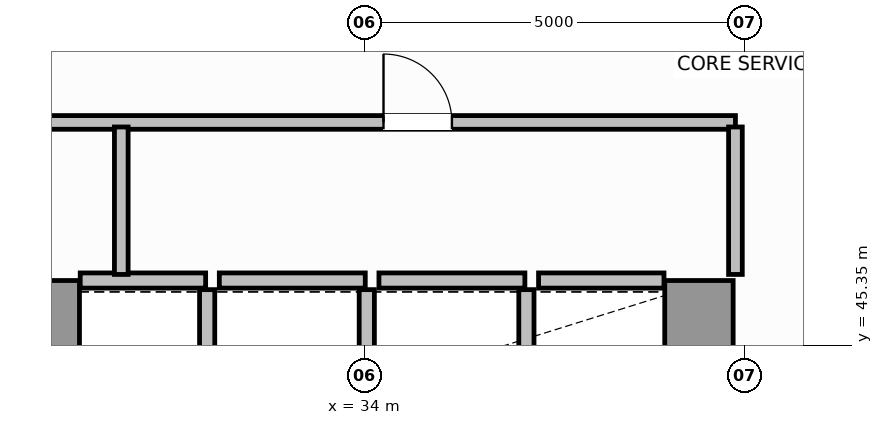
"""IFC4 building model, lengths in metres.
Left out: names, types, materials, properties, quantities, classifications, styles, units other than length and angle.
Written with IfcOpenShell. Run it as: python <this file> out.ifc"""

import sys

from ifc_helpers import new_model, si_unit, direction, frame, frame_2d, origin, place, context, subcontext, project, spatial, rectangle, extrude, source, transform, mapped, element, fill, save


model = new_model("IFC4")
c1 = context("Model", 3, precision=1e-05, world=origin(), true_north=direction((0.0, 1.0)))
c2 = subcontext(c1, "Body", "Model", "MODEL_VIEW")
j1 = project(units=[si_unit("LENGTHUNIT", "METRE"), si_unit("PLANEANGLEUNIT", "RADIAN")], contexts=[c1])
p1 = place(None, origin())
s1 = spatial("IfcSite", under=j1, at=p1, CompositionType="ELEMENT")
p2 = place(p1, origin())
s2 = spatial("IfcBuilding", under=s1, at=p2, CompositionType="ELEMENT")
p3 = place(p2, frame((0.0, 0.0, 45.4)))
s3 = spatial("IfcBuildingStorey", under=s2, at=p3, CompositionType="ELEMENT", Elevation=45.4)
for number, where, z_axis, x_axis in (
    (1, (29.8, 36.97, 0.0), (0.0, 0.0, 1.0), (0.0, 1.0, 0.0)),
    (2, (38.4, 36.97, 0.0), (0.0, 0.0, 1.0), (0.0, 1.0, 0.0)),
):
    element("IfcWall", number, at=place(p3, frame(where, z_axis=z_axis, x_axis=x_axis)), inside=s3, PredefinedType="SHEAR", context=c2, shape_type="SweptSolid", body=[
        extrude(rectangle(XDim=9.23, YDim=0.9, at=frame_2d((4.615, 0.0))), origin(), (0.0, 0.0, 1.0), 3.8),
    ])
p4 = place(p3, frame((30.26, 46.2, 0.0), z_axis=(0.0, 0.0, 1.0), x_axis=(1.0, 0.0, 0.0)))
e3 = element("IfcWall", 3, at=p4, inside=s3, PredefinedType="SOLIDWALL", context=c2, shape_type="SweptSolid", body=[
    extrude(rectangle(XDim=1.65, YDim=0.2, at=frame_2d((0.825, 0.0))), origin(), (0.0, 0.0, 1.0), 3.58),
])
p5 = place(p3, frame((31.93, 43.52, 0.0), z_axis=(0.0, 0.0, 1.0), x_axis=(0.0, 1.0, 0.0)))
e4 = element("IfcWall", 4, at=p5, inside=s3, PredefinedType="SOLIDWALL", context=c2, shape_type="SweptSolid", body=[
    extrude(rectangle(XDim=2.56, YDim=0.2, at=frame_2d((1.28, 0.0))), origin(), (0.0, 0.0, 1.0), 3.58),
])
p6 = place(p3, frame((32.09, 46.2, 0.0), z_axis=(0.0, 0.0, 1.0), x_axis=(1.0, 0.0, 0.0)))
e5 = element("IfcWall", 5, at=p6, inside=s3, PredefinedType="SOLIDWALL", context=c2, shape_type="SweptSolid", body=[
    extrude(rectangle(XDim=1.92, YDim=0.2, at=frame_2d((0.96, 0.0))), origin(), (0.0, 0.0, 1.0), 3.58),
])
p7 = place(p3, frame((34.03, 43.52, 0.0), z_axis=(0.0, 0.0, 1.0), x_axis=(0.0, 1.0, 0.0)))
e6 = element("IfcWall", 6, at=p7, inside=s3, PredefinedType="SOLIDWALL", context=c2, shape_type="SweptSolid", body=[
    extrude(rectangle(XDim=2.56, YDim=0.2, at=frame_2d((1.28, 0.0))), origin(), (0.0, 0.0, 1.0), 3.58),
])
p8 = place(p3, frame((34.19, 46.2, 0.0), z_axis=(0.0, 0.0, 1.0), x_axis=(1.0, 0.0, 0.0)))
e7 = element("IfcWall", 7, at=p8, inside=s3, PredefinedType="SOLIDWALL", context=c2, shape_type="SweptSolid", body=[
    extrude(rectangle(XDim=1.92, YDim=0.2, at=frame_2d((0.96, 0.0))), origin(), (0.0, 0.0, 1.0), 3.58),
])
p9 = place(p3, frame((36.13, 43.52, 0.0), z_axis=(0.0, 0.0, 1.0), x_axis=(0.0, 1.0, 0.0)))
e8 = element("IfcWall", 8, at=p9, inside=s3, PredefinedType="SOLIDWALL", context=c2, shape_type="SweptSolid", body=[
    extrude(rectangle(XDim=2.56, YDim=0.2, at=frame_2d((1.28, 0.0))), origin(), (0.0, 0.0, 1.0), 3.58),
])
p10 = place(p3, frame((36.29, 46.2, 0.0), z_axis=(0.0, 0.0, 1.0), x_axis=(1.0, 0.0, 0.0)))
e9 = element("IfcWall", 9, at=p10, inside=s3, PredefinedType="SOLIDWALL", context=c2, shape_type="SweptSolid", body=[
    extrude(rectangle(XDim=1.65, YDim=0.2, at=frame_2d((0.825, 0.0))), origin(), (0.0, 0.0, 1.0), 3.58),
])
p11 = place(p3, frame((23.85, 48.28, 0.0), z_axis=(0.0, 0.0, 1.0), x_axis=(1.0, 0.0, 0.0)))
e10 = element("IfcWall", 10, at=p11, inside=s3, PredefinedType="PLUMBINGWALL", context=c2, shape_type="SweptSolid", body=[
    extrude(rectangle(XDim=15.03, YDim=0.18, at=frame_2d((7.515, 0.0))), origin(), (0.0, 0.0, 1.0), 3.58),
])
p12 = place(p11, frame((2.9, 0.0, 0.0)))
e11 = element("IfcOpeningElement", 11, at=p12, cuts=e10, PredefinedType="OPENING", context=c2, shape_type="SweptSolid", body=[
    extrude(rectangle(XDim=0.9, YDim=2.15, at=frame_2d((0.45, 1.075))), frame((0.0, 0.1, 0.0), z_axis=(0.0, -1.0, 0.0), x_axis=(1.0, 0.0, 0.0)), (0.0, 0.0, 1.0), 0.2),
])
p13 = place(p11, frame((10.4, 0.0, 0.0)))
e12 = element("IfcOpeningElement", 12, at=p13, cuts=e10, PredefinedType="OPENING", context=c2, shape_type="SweptSolid", body=[
    extrude(rectangle(XDim=0.9, YDim=2.15, at=frame_2d((0.45, 1.075))), frame((0.0, 0.1, 0.0), z_axis=(0.0, -1.0, 0.0), x_axis=(1.0, 0.0, 0.0)), (0.0, 0.0, 1.0), 0.2),
])
for number, where, z_axis, x_axis in (
    (13, (30.8, 46.28, 0.0), (0.0, 0.0, 1.0), (0.0, 1.0, 0.0)),
    (14, (38.88, 46.28, 0.0), (0.0, 0.0, 1.0), (0.0, 1.0, 0.0)),
):
    element("IfcWall", number, at=place(p3, frame(where, z_axis=z_axis, x_axis=x_axis)), inside=s3, PredefinedType="PLUMBINGWALL", context=c2, shape_type="SweptSolid", body=[
        extrude(rectangle(XDim=1.94, YDim=0.18, at=frame_2d((0.97, 0.0))), origin(), (0.0, 0.0, 1.0), 3.58),
    ])
m1 = source(origin(), c2, "Body", "SweptSolid", [
    extrude(rectangle(XDim=0.9, YDim=2.15, at=frame_2d((0.45, 1.075))), frame((0.0, 0.025, 0.0), z_axis=(0.0, -1.0, 0.0), x_axis=(1.0, 0.0, 0.0)), (0.0, 0.0, 1.0), 0.05),
])
p14 = place(p13, origin())
e15 = element("IfcDoor", 15, at=p14, inside=s3, OperationType="SINGLE_SWING_LEFT", PredefinedType="DOOR", context=c2, shape_type="MappedRepresentation", body=[
    mapped(m1, transform((0.0, 0.0, 0.0), scale=1.0)),
])
fill(e12, e15)
save(model, sys.argv[1])
